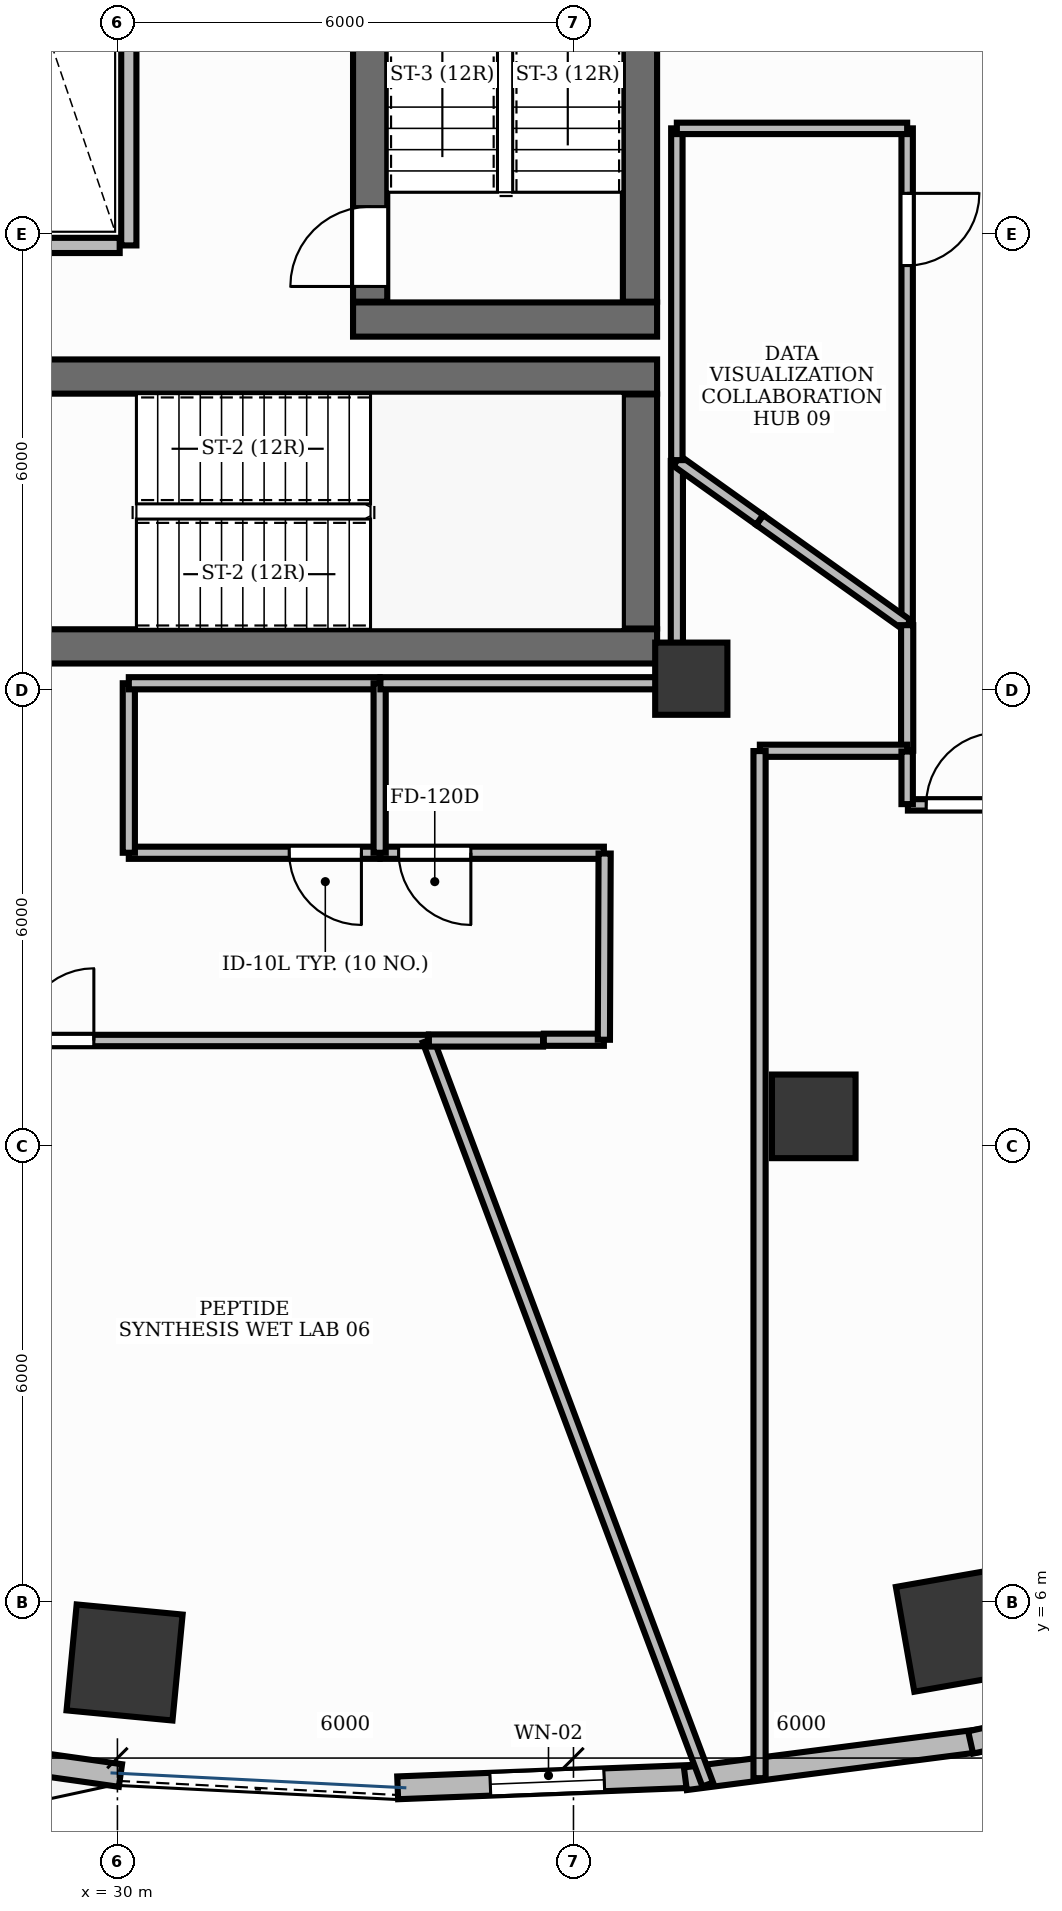
"""IFC4 building model, lengths in metres.
Left out: names, types, materials, properties, quantities, classifications, styles, units other than length and angle.
Written with IfcOpenShell. Run it as: python <this file> out.ifc"""

import sys

from ifc_helpers import new_model, si_unit, direction, frame, frame_2d, origin, origin_2d, place, context, subcontext, project, spatial, rectangle, extrude, element, fill, save


model = new_model("IFC4")
c1 = context("Model", 3, precision=1e-05, world=origin(), true_north=direction((0.0, 1.0)))
c2 = subcontext(c1, "Body", "Model", "MODEL_VIEW")
j1 = project(units=[si_unit("LENGTHUNIT", "METRE"), si_unit("PLANEANGLEUNIT", "RADIAN")], contexts=[c1])
p1 = place(None, origin())
s1 = spatial("IfcSite", under=j1, at=p1, CompositionType="ELEMENT")
p2 = place(p1, origin())
s2 = spatial("IfcBuilding", under=s1, at=p2, CompositionType="ELEMENT")
p3 = place(p2, frame((0.0, 0.0, 55.2)))
s3 = spatial("IfcBuildingStorey", under=s2, at=p3, CompositionType="ELEMENT", Elevation=55.2)
p4 = place(p3, frame((28.852, 18.575, 0.0), z_axis=(0.0, 0.0, 1.0), x_axis=(1.0, 0.0, 0.0)))
e1 = element("IfcWall", 1, at=p4, inside=s3, PredefinedType="SHEAR", context=c2, shape_type="SweptSolid", body=[
    extrude(rectangle(XDim=8.248, YDim=0.45, at=frame_2d((4.124, 0.0))), origin(), (0.0, 0.0, 1.0), 3.9),
])
p5 = place(p3, frame((28.35, 22.125, 0.0), z_axis=(0.0, 0.0, 1.0), x_axis=(1.0, 0.0, 0.0)))
e2 = element("IfcWall", 2, at=p5, inside=s3, PredefinedType="SHEAR", context=c2, shape_type="SweptSolid", body=[
    extrude(rectangle(XDim=8.75, YDim=0.45, at=frame_2d((4.375, 0.0))), origin(), (0.0, 0.0, 1.0), 3.9),
])
p6 = place(p3, frame((36.875, 18.81, 0.0), z_axis=(0.0, 0.0, 1.0), x_axis=(0.0, 1.0, 0.0)))
e3 = element("IfcWall", 3, at=p6, inside=s3, PredefinedType="SHEAR", context=c2, shape_type="SweptSolid", body=[
    extrude(rectangle(XDim=3.08, YDim=0.45, at=frame_2d((1.54, 0.0))), origin(), (0.0, 0.0, 1.0), 3.9),
])
p7 = place(p3, frame((33.1, 22.875, 0.0), z_axis=(0.0, 0.0, 1.0), x_axis=(1.0, 0.0, 0.0)))
e4 = element("IfcWall", 4, at=p7, inside=s3, PredefinedType="SHEAR", context=c2, shape_type="SweptSolid", body=[
    extrude(rectangle(XDim=4.0, YDim=0.45, at=frame_2d((2.0, 0.0))), origin(), (0.0, 0.0, 1.0), 3.9),
])
p8 = place(p3, frame((36.875, 23.11, 0.0), z_axis=(0.0, 0.0, 1.0), x_axis=(0.0, 1.0, 0.0)))
e5 = element("IfcWall", 5, at=p8, inside=s3, PredefinedType="SHEAR", context=c2, shape_type="SweptSolid", body=[
    extrude(rectangle(XDim=7.78, YDim=0.45, at=frame_2d((3.89, 0.0))), origin(), (0.0, 0.0, 1.0), 3.9),
])
p9 = place(p3, frame((33.325, 23.11, 0.0), z_axis=(0.0, 0.0, 1.0), x_axis=(0.0, 1.0, 0.0)))
e6 = element("IfcWall", 6, at=p9, inside=s3, PredefinedType="SHEAR", context=c2, shape_type="SweptSolid", body=[
    extrude(rectangle(XDim=7.78, YDim=0.45, at=frame_2d((3.89, 0.0))), origin(), (0.0, 0.0, 1.0), 3.9),
])
p10 = place(p9, frame((0.2, 0.0, 0.0)))
e7 = element("IfcOpeningElement", 7, at=p10, cuts=e6, PredefinedType="OPENING", context=c2, shape_type="SweptSolid", body=[
    extrude(rectangle(XDim=1.05, YDim=2.15, at=frame_2d((0.525, 1.075))), frame((0.0, 0.24, 0.0), z_axis=(0.0, -1.0, 0.0), x_axis=(1.0, 0.0, 0.0)), (0.0, 0.0, 1.0), 0.48),
])
p11 = place(p3, frame((37.55, 18.15, -0.0), z_axis=(0.0, 0.0, 1.0), x_axis=(1.0, 0.0, 0.0)))
e8 = element("IfcColumn", 8, at=p11, inside=s3, PredefinedType="PILASTER", context=c2, shape_type="SweptSolid", body=[
    extrude(rectangle(XDim=0.95, YDim=0.95, at=origin_2d()), origin(), (0.0, 0.0, 1.0), 3.901),
])
for number, where, z_axis, x_axis in (
    (9, (30.094, 5.208, -0.0), (0.0, 0.0, 1.0), (-0.995, 0.095, 0.0)),
    (10, (41.052, 5.633, -0.0), (0.0, 0.0, 1.0), (0.985, 0.173, 0.0)),
):
    element("IfcColumn", number, at=place(p3, frame(where, z_axis=z_axis, x_axis=x_axis)), inside=s3, PredefinedType="COLUMN", context=c2, shape_type="SweptSolid", body=[
        extrude(rectangle(XDim=1.4, YDim=1.4, at=origin_2d()), origin(), (0.0, 0.0, 1.0), 3.901),
    ])
p12 = place(p3, frame((39.161, 12.392, -0.0), z_axis=(0.0, 0.0, 1.0), x_axis=(1.0, 0.0, 0.0)))
e11 = element("IfcColumn", 11, at=p12, inside=s3, PredefinedType="COLUMN", context=c2, shape_type="SweptSolid", body=[
    extrude(rectangle(XDim=1.1, YDim=1.1, at=origin_2d()), origin(), (0.0, 0.0, 1.0), 3.901),
])
p13 = place(p3, frame((33.687, 3.558, 0.0), z_axis=(0.0, 0.0, 1.0), x_axis=(0.999247008469, 0.038799691558, 0.0)))
e12 = element("IfcWall", 12, at=p13, inside=s3, PredefinedType="STANDARD", context=c2, shape_type="SweptSolid", body=[
    extrude(rectangle(XDim=3.939, YDim=0.3, at=frame_2d((1.969, 0.0))), origin(), (0.0, 0.0, 1.0), 3.9),
])
p14 = place(p13, frame((1.219, 0.0, 0.95)))
e13 = element("IfcOpeningElement", 13, at=p14, cuts=e12, PredefinedType="OPENING", context=c2, shape_type="SweptSolid", body=[
    extrude(rectangle(XDim=1.5, YDim=1.8, at=frame_2d((0.75, 0.9))), frame((0.0, 0.165, 0.0), z_axis=(0.0, -1.0, 0.0), x_axis=(1.0, 0.0, 0.0)), (0.0, 0.0, 1.0), 0.33),
])
p15 = place(p3, frame((26.128, 4.273, 0.0), z_axis=(0.0, 0.0, 1.0), x_axis=(0.990165832998, -0.139898617443, 0.0)))
e14 = element("IfcWall", 14, at=p15, inside=s3, PredefinedType="STANDARD", context=c2, shape_type="SweptSolid", body=[
    extrude(rectangle(XDim=3.951, YDim=0.3, at=frame_2d((1.976, 0.0))), origin(), (0.0, 0.0, 1.0), 3.47),
])
p16 = place(p3, frame((37.472, 3.678, 0.0), z_axis=(0.0, 0.0, 1.0), x_axis=(0.991734095036, 0.128310111617, 0.0)))
e15 = element("IfcWall", 15, at=p16, inside=s3, PredefinedType="STANDARD", context=c2, shape_type="SweptSolid", body=[
    extrude(rectangle(XDim=3.956, YDim=0.3, at=frame_2d((1.978, 0.0))), origin(), (0.0, 0.0, 1.0), 3.9),
])
p17 = place(p3, frame((41.225, 4.155, 0.0), z_axis=(0.0, 0.0, 1.0), x_axis=(0.975868573345, 0.218358713032, 0.0)))
e16 = element("IfcWall", 16, at=p17, inside=s3, PredefinedType="STANDARD", context=c2, shape_type="SweptSolid", body=[
    extrude(rectangle(XDim=3.909, YDim=0.3, at=frame_2d((1.954, 0.0))), origin(), (0.0, 0.0, 1.0), 3.9),
])
p18 = place(p3, frame((30.15, 23.85, 0.0), z_axis=(0.0, 0.0, 1.0), x_axis=(0.0, 1.0, 0.0)))
e17 = element("IfcWall", 17, at=p18, inside=s3, PredefinedType="PARTITIONING", context=c2, shape_type="SweptSolid", body=[
    extrude(rectangle(XDim=6.35, YDim=0.2, at=frame_2d((3.175, 0.0))), origin(), (0.0, 0.0, 1.0), 2.91),
])
p19 = place(p3, frame((27.934, 23.85, 0.0), z_axis=(0.0, 0.0, 1.0), x_axis=(1.0, 0.0, 0.0)))
e18 = element("IfcWall", 18, at=p19, inside=s3, PredefinedType="PARTITIONING", context=c2, shape_type="SweptSolid", body=[
    extrude(rectangle(XDim=2.096, YDim=0.2, at=frame_2d((1.048, 0.0))), origin(), (0.0, 0.0, 1.0), 2.91),
])
p20 = place(p3, frame((33.45, 15.86, 0.0), z_axis=(0.0, 0.0, 1.0), x_axis=(-1.0, 0.0, 0.0)))
e19 = element("IfcWall", 19, at=p20, inside=s3, PredefinedType="PARTITIONING", context=c2, shape_type="SweptSolid", body=[
    extrude(rectangle(XDim=3.3, YDim=0.16, at=frame_2d((1.65, 0.0))), origin(), (0.0, 0.0, 1.0), 2.91),
])
p21 = place(p20, frame((0.24, 0.0, 0.0)))
e20 = element("IfcOpeningElement", 20, at=p21, cuts=e19, PredefinedType="OPENING", context=c2, shape_type="SweptSolid", body=[
    extrude(rectangle(XDim=0.95, YDim=2.15, at=frame_2d((0.475, 1.075))), frame((0.0, 0.095, 0.0), z_axis=(0.0, -1.0, 0.0), x_axis=(1.0, 0.0, 0.0)), (0.0, 0.0, 1.0), 0.19),
])
p22 = place(p3, frame((28.5, 13.39, 0.0), z_axis=(0.0, 0.0, 1.0), x_axis=(1.0, 0.0, 0.0)))
e21 = element("IfcWall", 21, at=p22, inside=s3, PredefinedType="PARTITIONING", context=c2, shape_type="SweptSolid", body=[
    extrude(rectangle(XDim=5.587, YDim=0.15, at=frame_2d((2.793, 0.0))), origin(), (0.0, 0.0, 1.0), 2.91),
])
p23 = place(p22, frame((0.24, 0.0, 0.0)))
e22 = element("IfcOpeningElement", 22, at=p23, cuts=e21, PredefinedType="OPENING", context=c2, shape_type="SweptSolid", body=[
    extrude(rectangle(XDim=0.95, YDim=2.15, at=frame_2d((0.475, 1.075))), frame((0.0, 0.09, 0.0), z_axis=(0.0, -1.0, 0.0), x_axis=(1.0, 0.0, 0.0)), (0.0, 0.0, 1.0), 0.18),
])
p24 = place(p3, frame((36.4, 15.86, 0.0), z_axis=(0.0, 0.0, 1.0), x_axis=(-1.0, 0.0, 0.0)))
e23 = element("IfcWall", 23, at=p24, inside=s3, PredefinedType="PARTITIONING", context=c2, shape_type="SweptSolid", body=[
    extrude(rectangle(XDim=2.94, YDim=0.16, at=frame_2d((1.47, 0.0))), origin(), (0.0, 0.0, 1.0), 2.91),
])
p25 = place(p24, frame((1.75, 0.0, 0.0)))
e24 = element("IfcOpeningElement", 24, at=p25, cuts=e23, PredefinedType="OPENING", context=c2, shape_type="SweptSolid", body=[
    extrude(rectangle(XDim=0.95, YDim=2.15, at=frame_2d((0.475, 1.075))), frame((0.0, 0.095, 0.0), z_axis=(0.0, -1.0, 0.0), x_axis=(1.0, 0.0, 0.0)), (0.0, 0.0, 1.0), 0.19),
])
p26 = place(p3, frame((40.4, 16.49, 0.0), z_axis=(0.0, 0.0, 1.0), x_axis=(1.0, 0.0, 0.0)))
e25 = element("IfcWall", 25, at=p26, inside=s3, PredefinedType="PARTITIONING", context=c2, shape_type="SweptSolid", body=[
    extrude(rectangle(XDim=3.8, YDim=0.15, at=frame_2d((1.9, 0.0))), origin(), (0.0, 0.0, 1.0), 2.91),
])
p27 = place(p26, frame((0.24, 0.0, 0.0)))
e26 = element("IfcOpeningElement", 26, at=p27, cuts=e25, PredefinedType="OPENING", context=c2, shape_type="SweptSolid", body=[
    extrude(rectangle(XDim=0.95, YDim=2.15, at=frame_2d((0.475, 1.075))), frame((0.0, 0.09, 0.0), z_axis=(0.0, -1.0, 0.0), x_axis=(1.0, 0.0, 0.0)), (0.0, 0.0, 1.0), 0.18),
])
p28 = place(p3, frame((40.39, 25.39, 0.0), z_axis=(0.0, 0.0, 1.0), x_axis=(0.0, -1.0, 0.0)))
e27 = element("IfcWall", 27, at=p28, inside=s3, PredefinedType="PARTITIONING", context=c2, shape_type="SweptSolid", body=[
    extrude(rectangle(XDim=6.523, YDim=0.15, at=frame_2d((3.262, 0.0))), origin(), (0.0, 0.0, 1.0), 2.91),
])
p29 = place(p28, frame((0.855, 0.0, 0.0)))
e28 = element("IfcOpeningElement", 28, at=p29, cuts=e27, PredefinedType="OPENING", context=c2, shape_type="SweptSolid", body=[
    extrude(rectangle(XDim=0.95, YDim=2.15, at=frame_2d((0.475, 1.075))), frame((0.0, 0.09, 0.0), z_axis=(0.0, -1.0, 0.0), x_axis=(1.0, 0.0, 0.0)), (0.0, 0.0, 1.0), 0.18),
])
p30 = place(p3, frame((30.15, 15.86, 0.0), z_axis=(0.0, 0.0, 1.0), x_axis=(0.0, 1.0, 0.0)))
e29 = element("IfcWall", 29, at=p30, inside=s3, PredefinedType="PARTITIONING", context=c2, shape_type="SweptSolid", body=[
    extrude(rectangle(XDim=2.23, YDim=0.16, at=frame_2d((1.115, 0.0))), origin(), (0.0, 0.0, 1.0), 2.91),
])
p31 = place(p3, frame((30.15, 18.09, 0.0), z_axis=(0.0, 0.0, 1.0), x_axis=(1.0, 0.0, 0.0)))
e30 = element("IfcWall", 30, at=p31, inside=s3, PredefinedType="PARTITIONING", context=c2, shape_type="SweptSolid", body=[
    extrude(rectangle(XDim=3.3, YDim=0.16, at=frame_2d((1.65, 0.0))), origin(), (0.0, 0.0, 1.0), 2.91),
])
p32 = place(p3, frame((33.45, 18.09, 0.0), z_axis=(0.0, 0.0, 1.0), x_axis=(0.0, -1.0, 0.0)))
e31 = element("IfcWall", 31, at=p32, inside=s3, PredefinedType="PARTITIONING", context=c2, shape_type="SweptSolid", body=[
    extrude(rectangle(XDim=2.23, YDim=0.16, at=frame_2d((1.115, 0.0))), origin(), (0.0, 0.0, 1.0), 2.91),
])
p33 = place(p3, frame((34.087, 13.39, 0.0), z_axis=(0.0, 0.0, 1.0), x_axis=(0.351837225237, -0.936061198286, 0.0)))
e32 = element("IfcWall", 32, at=p33, inside=s3, PredefinedType="PARTITIONING", context=c2, shape_type="SweptSolid", body=[
    extrude(rectangle(XDim=10.456, YDim=0.15, at=frame_2d((5.228, 0.0))), origin(), (0.0, 0.0, 1.0), 2.91),
])
p34 = place(p3, frame((38.452, 20.237, 0.0), z_axis=(0.0, 0.0, 1.0), x_axis=(0.814086766517, -0.580743262192, 0.0)))
e33 = element("IfcWall", 33, at=p34, inside=s3, PredefinedType="PARTITIONING", context=c2, shape_type="SweptSolid", body=[
    extrude(rectangle(XDim=2.38, YDim=0.16, at=frame_2d((1.19, 0.0))), origin(), (0.0, 0.0, 1.0), 2.91),
])
p35 = place(p3, frame((40.39, 18.854, 0.0), z_axis=(0.0, 0.0, 1.0), x_axis=(0.0, -1.0, 0.0)))
e34 = element("IfcWall", 34, at=p35, inside=s3, PredefinedType="PARTITIONING", context=c2, shape_type="SweptSolid", body=[
    extrude(rectangle(XDim=1.652, YDim=0.16, at=frame_2d((0.826, 0.0))), origin(), (0.0, 0.0, 1.0), 2.91),
])
p36 = place(p3, frame((40.39, 17.202, 0.0), z_axis=(0.0, 0.0, 1.0), x_axis=(-1.0, 0.0, 0.0)))
e35 = element("IfcWall", 35, at=p36, inside=s3, PredefinedType="PARTITIONING", context=c2, shape_type="SweptSolid", body=[
    extrude(rectangle(XDim=1.938, YDim=0.16, at=frame_2d((0.969, 0.0))), origin(), (0.0, 0.0, 1.0), 2.91),
])
p37 = place(p3, frame((38.448, 17.198, 0.0), z_axis=(0.0, 0.0, 1.0), x_axis=(0.0, -1.0, 0.0)))
e36 = element("IfcWall", 36, at=p37, inside=s3, PredefinedType="PARTITIONING", context=c2, shape_type="SweptSolid", body=[
    extrude(rectangle(XDim=13.513, YDim=0.16, at=frame_2d((6.756, 0.0))), origin(), (0.0, 0.0, 1.0), 2.91),
])
p38 = place(p3, frame((34.098, 13.39, 0.0), z_axis=(0.0, 0.0, 1.0), x_axis=(1.0, 0.0, 0.0)))
e37 = element("IfcWall", 37, at=p38, inside=s3, PredefinedType="PARTITIONING", context=c2, shape_type="SweptSolid", body=[
    extrude(rectangle(XDim=1.502, YDim=0.16, at=frame_2d((0.751, 0.0))), origin(), (0.0, 0.0, 1.0), 2.91),
])
p39 = place(p3, frame((35.61, 13.4, 0.0), z_axis=(0.0, 0.0, 1.0), x_axis=(1.0, 0.0, 0.0)))
e38 = element("IfcWall", 38, at=p39, inside=s3, PredefinedType="PARTITIONING", context=c2, shape_type="SweptSolid", body=[
    extrude(rectangle(XDim=0.79, YDim=0.16, at=frame_2d((0.395, 0.0))), origin(), (0.0, 0.0, 1.0), 2.91),
])
p40 = place(p3, frame((36.4, 13.4, 0.0), z_axis=(0.0, 0.0, 1.0), x_axis=(0.004085258855, 0.999991655295, 0.0)))
e39 = element("IfcWall", 39, at=p40, inside=s3, PredefinedType="PARTITIONING", context=c2, shape_type="SweptSolid", body=[
    extrude(rectangle(XDim=2.45, YDim=0.16, at=frame_2d((1.225, 0.0))), origin(), (0.0, 0.0, 1.0), 2.91),
])
p41 = place(p3, frame((33.46, 18.09, 0.0), z_axis=(0.0, 0.0, 1.0), x_axis=(1.0, 0.0, 0.0)))
e40 = element("IfcWall", 40, at=p41, inside=s3, PredefinedType="PARTITIONING", context=c2, shape_type="SweptSolid", body=[
    extrude(rectangle(XDim=3.89, YDim=0.16, at=frame_2d((1.945, 0.0))), origin(), (0.0, 0.0, 1.0), 2.91),
])
p42 = place(p3, frame((37.36, 18.1, 0.0), z_axis=(0.0, 0.0, 1.0), x_axis=(0.0, 1.0, 0.0)))
e41 = element("IfcWall", 41, at=p42, inside=s3, PredefinedType="PARTITIONING", context=c2, shape_type="SweptSolid", body=[
    extrude(rectangle(XDim=2.916, YDim=0.16, at=frame_2d((1.458, 0.0))), origin(), (0.0, 0.0, 1.0), 2.91),
])
p43 = place(p3, frame((37.36, 21.016, 0.0), z_axis=(0.0, 0.0, 1.0), x_axis=(0.814066623235, -0.580771498039, 0.0)))
e42 = element("IfcWall", 42, at=p43, inside=s3, PredefinedType="PARTITIONING", context=c2, shape_type="SweptSolid", body=[
    extrude(rectangle(XDim=1.336, YDim=0.16, at=frame_2d((0.668, 0.0))), origin(), (0.0, 0.0, 1.0), 2.91),
])
p44 = place(p3, frame((40.39, 17.192, 0.0), z_axis=(0.0, 0.0, 1.0), x_axis=(0.0, -1.0, 0.0)))
e43 = element("IfcWall", 43, at=p44, inside=s3, PredefinedType="PARTITIONING", context=c2, shape_type="SweptSolid", body=[
    extrude(rectangle(XDim=0.692, YDim=0.15, at=frame_2d((0.346, 0.0))), origin(), (0.0, 0.0, 1.0), 2.91),
])
p45 = place(p3, frame((37.36, 21.026, 0.0), z_axis=(0.0, 0.0, 1.0), x_axis=(0.0, 1.0, 0.0)))
e44 = element("IfcWall", 44, at=p45, inside=s3, PredefinedType="PARTITIONING", context=c2, shape_type="SweptSolid", body=[
    extrude(rectangle(XDim=4.364, YDim=0.15, at=frame_2d((2.182, 0.0))), origin(), (0.0, 0.0, 1.0), 2.91),
])
p46 = place(p3, frame((37.36, 25.39, 0.0), z_axis=(0.0, 0.0, 1.0), x_axis=(1.0, 0.0, 0.0)))
e45 = element("IfcWall", 45, at=p46, inside=s3, PredefinedType="PARTITIONING", context=c2, shape_type="SweptSolid", body=[
    extrude(rectangle(XDim=3.03, YDim=0.15, at=frame_2d((1.515, 0.0))), origin(), (0.0, 0.0, 1.0), 2.91),
])
p47 = place(p14, origin())
e46 = element("IfcWindow", 46, at=p47, inside=s3, PartitioningType="DOUBLE_PANEL_VERTICAL", PredefinedType="WINDOW", context=c2, shape_type="SweptSolid", body=[
    extrude(rectangle(XDim=1.5, YDim=1.8, at=frame_2d((0.75, 0.9))), frame((0.0, 0.03, 0.0), z_axis=(0.0, -1.0, 0.0), x_axis=(1.0, 0.0, 0.0)), (0.0, 0.0, 1.0), 0.06),
])
fill(e13, e46)
p48 = place(p10, origin())
e47 = element("IfcDoor", 47, at=p48, inside=s3, OperationType="SINGLE_SWING_LEFT", PredefinedType="DOOR", context=c2, shape_type="SweptSolid", body=[
    extrude(rectangle(XDim=1.05, YDim=2.15, at=frame_2d((0.525, 1.075))), frame((0.0, 0.025, 0.0), z_axis=(0.0, -1.0, 0.0), x_axis=(1.0, 0.0, 0.0)), (0.0, 0.0, 1.0), 0.05),
])
fill(e7, e47)
p49 = place(p21, origin())
e48 = element("IfcDoor", 48, at=p49, inside=s3, OperationType="SINGLE_SWING_LEFT", PredefinedType="DOOR", context=c2, shape_type="SweptSolid", body=[
    extrude(rectangle(XDim=0.95, YDim=2.15, at=frame_2d((0.475, 1.075))), frame((0.0, 0.025, 0.0), z_axis=(0.0, -1.0, 0.0), x_axis=(1.0, 0.0, 0.0)), (0.0, 0.0, 1.0), 0.05),
])
fill(e20, e48)
p50 = place(p23, origin())
e49 = element("IfcDoor", 49, at=p50, inside=s3, OperationType="SINGLE_SWING_RIGHT", PredefinedType="DOOR", context=c2, shape_type="SweptSolid", body=[
    extrude(rectangle(XDim=0.95, YDim=2.15, at=frame_2d((0.475, 1.075))), frame((0.0, 0.025, 0.0), z_axis=(0.0, -1.0, 0.0), x_axis=(1.0, 0.0, 0.0)), (0.0, 0.0, 1.0), 0.05),
])
fill(e22, e49)
p51 = place(p25, origin())
e50 = element("IfcDoor", 50, at=p51, inside=s3, OperationType="SINGLE_SWING_LEFT", PredefinedType="DOOR", context=c2, shape_type="SweptSolid", body=[
    extrude(rectangle(XDim=0.95, YDim=2.15, at=frame_2d((0.475, 1.075))), frame((0.0, 0.025, 0.0), z_axis=(0.0, -1.0, 0.0), x_axis=(1.0, 0.0, 0.0)), (0.0, 0.0, 1.0), 0.05),
])
fill(e24, e50)
p52 = place(p27, origin())
e51 = element("IfcDoor", 51, at=p52, inside=s3, OperationType="SINGLE_SWING_RIGHT", PredefinedType="DOOR", context=c2, shape_type="SweptSolid", body=[
    extrude(rectangle(XDim=0.95, YDim=2.15, at=frame_2d((0.475, 1.075))), frame((0.0, 0.025, 0.0), z_axis=(0.0, -1.0, 0.0), x_axis=(1.0, 0.0, 0.0)), (0.0, 0.0, 1.0), 0.05),
])
fill(e26, e51)
p53 = place(p29, origin())
e52 = element("IfcDoor", 52, at=p53, inside=s3, OperationType="SINGLE_SWING_LEFT", PredefinedType="DOOR", context=c2, shape_type="SweptSolid", body=[
    extrude(rectangle(XDim=0.95, YDim=2.15, at=frame_2d((0.475, 1.075))), frame((0.0, 0.025, 0.0), z_axis=(0.0, -1.0, 0.0), x_axis=(1.0, 0.0, 0.0)), (0.0, 0.0, 1.0), 0.05),
])
fill(e28, e52)
save(model, sys.argv[1])
